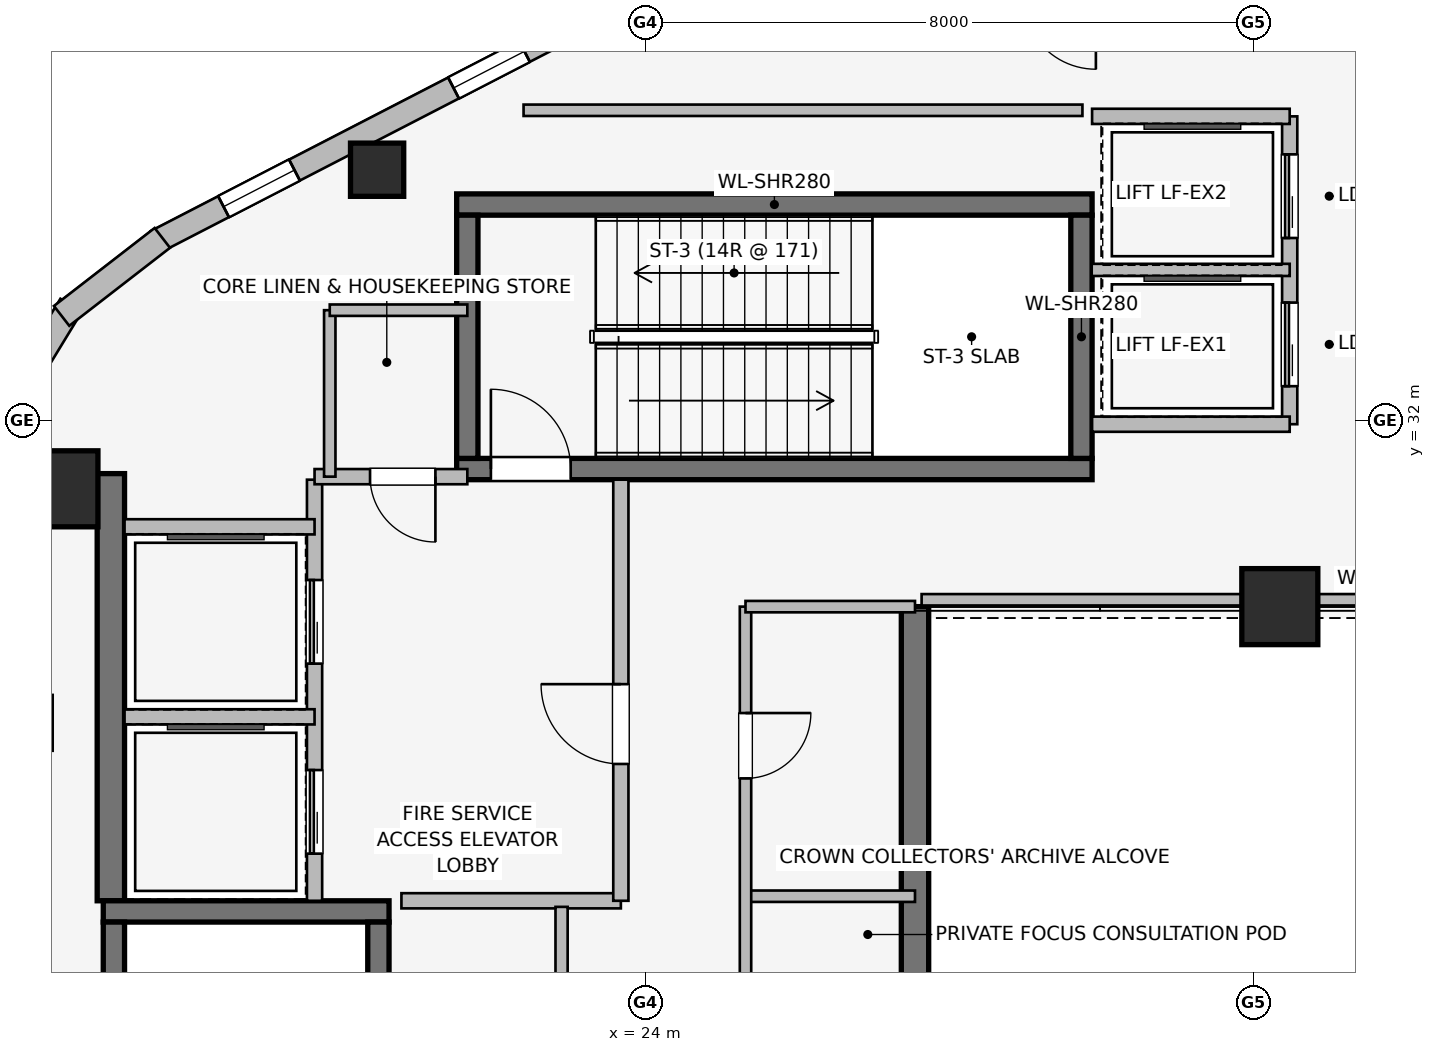
"""IFC4 building model, lengths in metres.
Left out: names, types, materials, properties, quantities, classifications, styles, units other than length and angle.
Written with IfcOpenShell. Run it as: python <this file> out.ifc"""

import sys

from ifc_helpers import new_model, si_unit, direction, frame, frame_2d, origin, origin_2d, place, context, subcontext, project, spatial, rectangle, extrude, element, fill, save


model = new_model("IFC4")
c1 = context("Model", 3, precision=1e-05, world=origin(), true_north=direction((0.0, 1.0)))
c2 = subcontext(c1, "Body", "Model", "MODEL_VIEW")
j1 = project(units=[si_unit("LENGTHUNIT", "METRE"), si_unit("PLANEANGLEUNIT", "RADIAN")], contexts=[c1])
p1 = place(None, origin())
s1 = spatial("IfcSite", under=j1, at=p1, CompositionType="ELEMENT")
p2 = place(p1, origin())
s2 = spatial("IfcBuilding", under=s1, at=p2, CompositionType="ELEMENT")
p3 = place(p2, frame((0.0, 0.0, 275.1)))
s3 = spatial("IfcBuildingStorey", under=s2, at=p3, CompositionType="ELEMENT", Elevation=275.1)
p4 = place(p3, frame((16.97, 25.68, 0.0), z_axis=(0.0, 0.0, 1.0), x_axis=(0.0, 1.0, 0.0)))
e1 = element("IfcWall", 1, at=p4, inside=s3, PredefinedType="SHEAR", context=c2, shape_type="SweptSolid", body=[
    extrude(rectangle(XDim=5.62, YDim=0.36, at=frame_2d((2.81, 0.0))), origin(), (0.0, 0.0, 1.0), 4.8),
])
p5 = place(p3, frame((27.55, 29.55, 0.0), z_axis=(0.0, 0.0, 1.0), x_axis=(0.0, -1.0, 0.0)))
e2 = element("IfcWall", 2, at=p5, inside=s3, PredefinedType="SHEAR", context=c2, shape_type="SweptSolid", body=[
    extrude(rectangle(XDim=11.25, YDim=0.36, at=frame_2d((5.625, 0.0))), origin(), (0.0, 0.0, 1.0), 4.8),
])
p6 = place(p3, frame((20.63, 25.54, 0.0), z_axis=(0.0, 0.0, 1.0), x_axis=(-1.0, 0.0, 0.0)))
e3 = element("IfcWall", 3, at=p6, inside=s3, PredefinedType="SHEAR", context=c2, shape_type="SweptSolid", body=[
    extrude(rectangle(XDim=3.76, YDim=0.28, at=frame_2d((1.88, 0.0))), origin(), (0.0, 0.0, 1.0), 4.8),
])
p7 = place(p3, frame((17.01, 25.4, 0.0), z_axis=(0.0, 0.0, 1.0), x_axis=(0.0, -1.0, 0.0)))
e4 = element("IfcWall", 4, at=p7, inside=s3, PredefinedType="SHEAR", context=c2, shape_type="SweptSolid", body=[
    extrude(rectangle(XDim=7.8, YDim=0.28, at=frame_2d((3.9, 0.0))), origin(), (0.0, 0.0, 1.0), 4.8),
])
p8 = place(p3, frame((20.49, 17.6, 0.0), z_axis=(0.0, 0.0, 1.0), x_axis=(0.0, 1.0, 0.0)))
e5 = element("IfcWall", 5, at=p8, inside=s3, PredefinedType="SHEAR", context=c2, shape_type="SweptSolid", body=[
    extrude(rectangle(XDim=7.8, YDim=0.28, at=frame_2d((3.9, 0.0))), origin(), (0.0, 0.0, 1.0), 4.8),
])
p9 = place(p8, frame((0.44, 0.0, 0.0)))
e6 = element("IfcOpeningElement", 6, at=p9, cuts=e5, PredefinedType="OPENING", context=c2, shape_type="SweptSolid", body=[
    extrude(rectangle(XDim=1.05, YDim=2.0, at=frame_2d((0.525, 1.0))), frame((0.0, 0.15, 0.0), z_axis=(0.0, -1.0, 0.0), x_axis=(1.0, 0.0, 0.0)), (0.0, 0.0, 1.0), 0.3),
])
p10 = place(p3, frame((21.52, 31.36, 0.0), z_axis=(0.0, 0.0, 1.0), x_axis=(1.0, 0.0, 0.0)))
e7 = element("IfcWall", 7, at=p10, inside=s3, PredefinedType="SHEAR", context=c2, shape_type="SweptSolid", body=[
    extrude(rectangle(XDim=8.36, YDim=0.28, at=frame_2d((4.18, 0.0))), origin(), (0.0, 0.0, 1.0), 4.8),
])
p11 = place(p10, frame((0.45, 0.0, 0.0)))
e8 = element("IfcOpeningElement", 8, at=p11, cuts=e7, PredefinedType="OPENING", context=c2, shape_type="SweptSolid", body=[
    extrude(rectangle(XDim=1.05, YDim=2.0, at=frame_2d((0.525, 1.0))), frame((0.0, 0.15, 0.0), z_axis=(0.0, -1.0, 0.0), x_axis=(1.0, 0.0, 0.0)), (0.0, 0.0, 1.0), 0.3),
])
p12 = place(p3, frame((29.88, 34.84, 0.0), z_axis=(0.0, 0.0, 1.0), x_axis=(-1.0, 0.0, 0.0)))
e9 = element("IfcWall", 9, at=p12, inside=s3, PredefinedType="SHEAR", context=c2, shape_type="SweptSolid", body=[
    extrude(rectangle(XDim=8.36, YDim=0.28, at=frame_2d((4.18, 0.0))), origin(), (0.0, 0.0, 1.0), 4.8),
])
for number, where, z_axis, x_axis in (
    (10, (21.66, 34.7, 0.0), (0.0, 0.0, 1.0), (0.0, -1.0, 0.0)),
    (11, (29.74, 31.5, 0.0), (0.0, 0.0, 1.0), (0.0, 1.0, 0.0)),
):
    element("IfcWall", number, at=place(p3, frame(where, z_axis=z_axis, x_axis=x_axis)), inside=s3, PredefinedType="SHEAR", context=c2, shape_type="SweptSolid", body=[
        extrude(rectangle(XDim=3.2, YDim=0.28, at=frame_2d((1.6, 0.0))), origin(), (0.0, 0.0, 1.0), 4.8),
    ])
for number, where, z_axis, x_axis in (
    (12, (16.3, 31.1, 0.0), (0.0, 0.0, 1.0), (1.0, 0.0, 0.0)),
    (13, (32.35, 29.55, 0.0), (0.0, 0.0, 1.0), (1.0, 0.0, 0.0)),
):
    element("IfcColumn", number, at=place(p3, frame(where, z_axis=z_axis, x_axis=x_axis)), inside=s3, PredefinedType="COLUMN", context=c2, shape_type="SweptSolid", body=[
        extrude(rectangle(XDim=1.0, YDim=1.0, at=origin_2d()), origin(), (0.0, 0.0, 1.0), 4.8),
    ])
p13 = place(p3, frame((20.473, 35.298, 0.0), z_axis=(0.0, 0.0, 1.0), x_axis=(1.0, 0.0, 0.0)))
e14 = element("IfcColumn", 14, at=p13, inside=s3, PredefinedType="COLUMN", context=c2, shape_type="SweptSolid", body=[
    extrude(rectangle(XDim=0.7, YDim=0.7, at=origin_2d()), origin(), (0.0, 0.0, 1.0), 4.8),
])
p14 = place(p3, frame((17.566, 34.354, 0.0), z_axis=(0.0, 0.0, 1.0), x_axis=(0.888622971019, 0.458638436437, 0.0)))
e15 = element("IfcWall", 15, at=p14, inside=s3, PredefinedType="STANDARD", context=c2, shape_type="SweptSolid", body=[
    extrude(rectangle(XDim=6.936, YDim=0.31, at=frame_2d((3.468, 0.0))), origin(), (0.0, 0.0, 1.0), 4.49),
])
p15 = place(p14, frame((0.998, 0.0, 0.75)))
e16 = element("IfcOpeningElement", 16, at=p15, cuts=e15, PredefinedType="OPENING", context=c2, shape_type="SweptSolid", body=[
    extrude(rectangle(XDim=1.05, YDim=1.4, at=frame_2d((0.525, 0.7))), frame((0.0, 0.165, 0.0), z_axis=(0.0, -1.0, 0.0), x_axis=(1.0, 0.0, 0.0)), (0.0, 0.0, 1.0), 0.33),
])
p16 = place(p14, frame((4.403, 0.0, 0.75)))
e17 = element("IfcOpeningElement", 17, at=p16, cuts=e15, PredefinedType="OPENING", context=c2, shape_type="SweptSolid", body=[
    extrude(rectangle(XDim=1.05, YDim=1.4, at=frame_2d((0.525, 0.7))), frame((0.0, 0.165, 0.0), z_axis=(0.0, -1.0, 0.0), x_axis=(1.0, 0.0, 0.0)), (0.0, 0.0, 1.0), 0.33),
])
p17 = place(p3, frame((15.574, 32.082, 0.0), z_axis=(0.0, 0.0, 1.0), x_axis=(0.520325409202, 0.853968072318, 0.0)))
e18 = element("IfcWall", 18, at=p17, inside=s3, PredefinedType="STANDARD", context=c2, shape_type="SweptSolid", body=[
    extrude(rectangle(XDim=1.678, YDim=0.33, at=frame_2d((0.839, 0.0))), origin(), (0.0, 0.0, 1.0), 4.49),
])
p18 = place(p3, frame((16.322, 33.375, 0.0), z_axis=(0.0, 0.0, 1.0), x_axis=(0.790691856293, 0.61221433207, 0.0)))
e19 = element("IfcWall", 19, at=p18, inside=s3, PredefinedType="STANDARD", context=c2, shape_type="SweptSolid", body=[
    extrude(rectangle(XDim=1.676, YDim=0.33, at=frame_2d((0.838, 0.0))), origin(), (0.0, 0.0, 1.0), 4.49),
])
p19 = place(p3, frame((19.65, 25.68, 0.0), z_axis=(0.0, 0.0, 1.0), x_axis=(0.0, 1.0, 0.0)))
e20 = element("IfcWall", 20, at=p19, inside=s3, PredefinedType="PARTITIONING", context=c2, shape_type="SweptSolid", body=[
    extrude(rectangle(XDim=5.54, YDim=0.2, at=frame_2d((2.77, 0.0))), origin(), (0.0, 0.0, 1.0), 4.49),
])
p20 = place(p19, frame((0.62, 0.0, 0.0)))
e21 = element("IfcOpeningElement", 21, at=p20, cuts=e20, PredefinedType="OPENING", context=c2, shape_type="SweptSolid", body=[
    extrude(rectangle(XDim=1.1, YDim=2.2, at=frame_2d((0.55, 1.1))), frame((0.0, 0.11, 0.0), z_axis=(0.0, -1.0, 0.0), x_axis=(1.0, 0.0, 0.0)), (0.0, 0.0, 1.0), 0.22),
])
p21 = place(p19, frame((3.12, 0.0, 0.0)))
e22 = element("IfcOpeningElement", 22, at=p21, cuts=e20, PredefinedType="OPENING", context=c2, shape_type="SweptSolid", body=[
    extrude(rectangle(XDim=1.1, YDim=2.2, at=frame_2d((0.55, 1.1))), frame((0.0, 0.11, 0.0), z_axis=(0.0, -1.0, 0.0), x_axis=(1.0, 0.0, 0.0)), (0.0, 0.0, 1.0), 0.22),
])
p22 = place(p3, frame((20.793, 25.68, 0.0), z_axis=(0.0, 0.0, 1.0), x_axis=(1.0, 0.0, 0.0)))
e23 = element("IfcWall", 23, at=p22, inside=s3, PredefinedType="PARTITIONING", context=c2, shape_type="SweptSolid", body=[
    extrude(rectangle(XDim=2.887, YDim=0.2, at=frame_2d((1.443, 0.0))), origin(), (0.0, 0.0, 1.0), 4.49),
])
p23 = place(p3, frame((23.68, 25.68, 0.0), z_axis=(0.0, 0.0, 1.0), x_axis=(0.0, 1.0, 0.0)))
e24 = element("IfcWall", 24, at=p23, inside=s3, PredefinedType="PARTITIONING", context=c2, shape_type="SweptSolid", body=[
    extrude(rectangle(XDim=5.54, YDim=0.2, at=frame_2d((2.77, 0.0))), origin(), (0.0, 0.0, 1.0), 4.49),
])
p24 = place(p23, frame((1.8, 0.0, 0.0)))
e25 = element("IfcOpeningElement", 25, at=p24, cuts=e24, PredefinedType="OPENING", context=c2, shape_type="SweptSolid", body=[
    extrude(rectangle(XDim=1.05, YDim=2.0, at=frame_2d((0.525, 1.0))), frame((0.0, 0.11, 0.0), z_axis=(0.0, -1.0, 0.0), x_axis=(1.0, 0.0, 0.0)), (0.0, 0.0, 1.0), 0.22),
])
p25 = place(p3, frame((21.66, 31.26, 0.0), z_axis=(0.0, 0.0, 1.0), x_axis=(-1.0, 0.0, 0.0)))
e26 = element("IfcWall", 26, at=p25, inside=s3, PredefinedType="PARTITIONING", context=c2, shape_type="SweptSolid", body=[
    extrude(rectangle(XDim=2.01, YDim=0.2, at=frame_2d((1.005, 0.0))), origin(), (0.0, 0.0, 1.0), 4.49),
])
p26 = place(p25, frame((0.42, 0.0, 0.0)))
e27 = element("IfcOpeningElement", 27, at=p26, cuts=e26, PredefinedType="OPENING", context=c2, shape_type="SweptSolid", body=[
    extrude(rectangle(XDim=0.86, YDim=2.0, at=frame_2d((0.43, 1.0))), frame((0.0, 0.11, 0.0), z_axis=(0.0, -1.0, 0.0), x_axis=(1.0, 0.0, 0.0)), (0.0, 0.0, 1.0), 0.22),
])
p27 = place(p3, frame((17.15, 28.1, 0.0), z_axis=(0.0, 0.0, 1.0), x_axis=(1.0, 0.0, 0.0)))
e28 = element("IfcWall", 28, at=p27, inside=s3, PredefinedType="PARTITIONING", context=c2, shape_type="SweptSolid", body=[
    extrude(rectangle(XDim=2.5, YDim=0.2, at=frame_2d((1.25, 0.0))), origin(), (0.0, 0.0, 1.0), 4.49),
])
p28 = place(p3, frame((19.65, 30.6, 0.0), z_axis=(0.0, 0.0, 1.0), x_axis=(-1.0, 0.0, 0.0)))
e29 = element("IfcWall", 29, at=p28, inside=s3, PredefinedType="PARTITIONING", context=c2, shape_type="SweptSolid", body=[
    extrude(rectangle(XDim=2.5, YDim=0.2, at=frame_2d((1.25, 0.0))), origin(), (0.0, 0.0, 1.0), 3.39),
])
p29 = place(p3, frame((32.48, 31.95, 0.0), z_axis=(0.0, 0.0, 1.0), x_axis=(0.0, 1.0, 0.0)))
e30 = element("IfcWall", 30, at=p29, inside=s3, PredefinedType="PARTITIONING", context=c2, shape_type="SweptSolid", body=[
    extrude(rectangle(XDim=4.05, YDim=0.2, at=frame_2d((2.025, 0.0))), origin(), (0.0, 0.0, 1.0), 4.49),
])
p30 = place(p29, frame((0.5, 0.0, 0.0)))
e31 = element("IfcOpeningElement", 31, at=p30, cuts=e30, PredefinedType="OPENING", context=c2, shape_type="SweptSolid", body=[
    extrude(rectangle(XDim=1.1, YDim=2.2, at=frame_2d((0.55, 1.1))), frame((0.0, 0.11, 0.0), z_axis=(0.0, -1.0, 0.0), x_axis=(1.0, 0.0, 0.0)), (0.0, 0.0, 1.0), 0.22),
])
p31 = place(p29, frame((2.45, 0.0, 0.0)))
e32 = element("IfcOpeningElement", 32, at=p31, cuts=e30, PredefinedType="OPENING", context=c2, shape_type="SweptSolid", body=[
    extrude(rectangle(XDim=1.1, YDim=2.2, at=frame_2d((0.55, 1.1))), frame((0.0, 0.11, 0.0), z_axis=(0.0, -1.0, 0.0), x_axis=(1.0, 0.0, 0.0)), (0.0, 0.0, 1.0), 0.22),
])
p32 = place(p3, frame((29.88, 36.0, 0.0), z_axis=(0.0, 0.0, 1.0), x_axis=(1.0, 0.0, 0.0)))
e33 = element("IfcWall", 33, at=p32, inside=s3, PredefinedType="PARTITIONING", context=c2, shape_type="SweptSolid", body=[
    extrude(rectangle(XDim=2.6, YDim=0.2, at=frame_2d((1.3, 0.0))), origin(), (0.0, 0.0, 1.0), 4.49),
])
p33 = place(p3, frame((32.48, 31.95, 0.0), z_axis=(0.0, 0.0, 1.0), x_axis=(-1.0, 0.0, 0.0)))
e34 = element("IfcWall", 34, at=p33, inside=s3, PredefinedType="PARTITIONING", context=c2, shape_type="SweptSolid", body=[
    extrude(rectangle(XDim=2.6, YDim=0.2, at=frame_2d((1.3, 0.0))), origin(), (0.0, 0.0, 1.0), 3.882),
])
p34 = place(p3, frame((29.875, 33.98, 0.0), z_axis=(0.0, 0.0, 1.0), x_axis=(1.0, 0.0, 0.0)))
e35 = element("IfcWall", 35, at=p34, inside=s3, PredefinedType="PARTITIONING", context=c2, shape_type="SweptSolid", body=[
    extrude(rectangle(XDim=2.605, YDim=0.16, at=frame_2d((1.302, 0.0))), origin(), (0.0, 0.0, 1.0), 4.49),
])
p35 = place(p3, frame((22.9, 19.5, 0.0), z_axis=(0.0, 0.0, 1.0), x_axis=(0.0, 1.0, 0.0)))
e36 = element("IfcWall", 36, at=p35, inside=s3, PredefinedType="PARTITIONING", context=c2, shape_type="SweptSolid", body=[
    extrude(rectangle(XDim=6.1, YDim=0.16, at=frame_2d((3.05, 0.0))), origin(), (0.0, 0.0, 1.0), 4.49),
])
p36 = place(p35, frame((2.4, 0.0, 0.0)))
e37 = element("IfcOpeningElement", 37, at=p36, cuts=e36, PredefinedType="OPENING", context=c2, shape_type="SweptSolid", body=[
    extrude(rectangle(XDim=0.9, YDim=2.0, at=frame_2d((0.45, 1.0))), frame((0.0, 0.09, 0.0), z_axis=(0.0, -1.0, 0.0), x_axis=(1.0, 0.0, 0.0)), (0.0, 0.0, 1.0), 0.18),
])
p37 = place(p3, frame((25.32, 25.74, 0.0), z_axis=(0.0, 0.0, 1.0), x_axis=(1.0, 0.0, 0.0)))
e38 = element("IfcWall", 38, at=p37, inside=s3, PredefinedType="PARTITIONING", context=c2, shape_type="SweptSolid", body=[
    extrude(rectangle(XDim=2.23, YDim=0.15, at=frame_2d((1.115, 0.0))), origin(), (0.0, 0.0, 1.0), 4.49),
])
p38 = place(p3, frame((25.32, 29.55, 0.0), z_axis=(0.0, 0.0, 1.0), x_axis=(0.0, -1.0, 0.0)))
e39 = element("IfcWall", 39, at=p38, inside=s3, PredefinedType="PARTITIONING", context=c2, shape_type="SweptSolid", body=[
    extrude(rectangle(XDim=11.19, YDim=0.15, at=frame_2d((5.595, 0.0))), origin(), (0.0, 0.0, 1.0), 4.49),
])
p39 = place(p38, frame((1.4, 0.0, 0.0)))
e40 = element("IfcOpeningElement", 40, at=p39, cuts=e39, PredefinedType="OPENING", context=c2, shape_type="SweptSolid", body=[
    extrude(rectangle(XDim=0.86, YDim=2.0, at=frame_2d((0.43, 1.0))), frame((0.0, 0.085, 0.0), z_axis=(0.0, -1.0, 0.0), x_axis=(1.0, 0.0, 0.0)), (0.0, 0.0, 1.0), 0.17),
])
p40 = place(p38, frame((5.25, 0.0, 0.0)))
e41 = element("IfcOpeningElement", 41, at=p40, cuts=e39, PredefinedType="OPENING", context=c2, shape_type="SweptSolid", body=[
    extrude(rectangle(XDim=0.86, YDim=2.0, at=frame_2d((0.43, 1.0))), frame((0.0, 0.085, 0.0), z_axis=(0.0, -1.0, 0.0), x_axis=(1.0, 0.0, 0.0)), (0.0, 0.0, 1.0), 0.17),
])
p41 = place(p38, frame((9.05, 0.0, 0.0)))
e42 = element("IfcOpeningElement", 42, at=p41, cuts=e39, PredefinedType="OPENING", context=c2, shape_type="SweptSolid", body=[
    extrude(rectangle(XDim=0.86, YDim=2.0, at=frame_2d((0.43, 1.0))), frame((0.0, 0.085, 0.0), z_axis=(0.0, -1.0, 0.0), x_axis=(1.0, 0.0, 0.0)), (0.0, 0.0, 1.0), 0.17),
])
p42 = place(p3, frame((27.55, 29.55, 0.0), z_axis=(0.0, 0.0, 1.0), x_axis=(-1.0, 0.0, 0.0)))
e43 = element("IfcWall", 43, at=p42, inside=s3, PredefinedType="PARTITIONING", context=c2, shape_type="SweptSolid", body=[
    extrude(rectangle(XDim=2.23, YDim=0.15, at=frame_2d((1.115, 0.0))), origin(), (0.0, 0.0, 1.0), 3.39),
])
p43 = place(p3, frame((19.85, 33.45, 0.0), z_axis=(0.0, 0.0, 1.0), x_axis=(0.0, -1.0, 0.0)))
e44 = element("IfcWall", 44, at=p43, inside=s3, PredefinedType="PARTITIONING", context=c2, shape_type="SweptSolid", body=[
    extrude(rectangle(XDim=2.19, YDim=0.15, at=frame_2d((1.095, 0.0))), origin(), (0.0, 0.0, 1.0), 4.49),
])
p44 = place(p3, frame((21.66, 33.45, 0.0), z_axis=(0.0, 0.0, 1.0), x_axis=(-1.0, 0.0, 0.0)))
e45 = element("IfcWall", 45, at=p44, inside=s3, PredefinedType="PARTITIONING", context=c2, shape_type="SweptSolid", body=[
    extrude(rectangle(XDim=1.81, YDim=0.15, at=frame_2d((0.905, 0.0))), origin(), (0.0, 0.0, 1.0), 4.49),
])
p45 = place(p3, frame((39.84, 29.64, 0.0), z_axis=(0.0, 0.0, 1.0), x_axis=(-1.0, 0.0, 0.0)))
e46 = element("IfcWall", 46, at=p45, inside=s3, PredefinedType="PARTITIONING", context=c2, shape_type="SweptSolid", body=[
    extrude(rectangle(XDim=12.203, YDim=0.15, at=frame_2d((6.102, 0.0))), origin(), (0.0, 0.0, 1.0), 3.631),
])
p46 = place(p3, frame((29.753, 36.08, 0.0), z_axis=(0.0, 0.0, 1.0), x_axis=(-1.0, 0.0, 0.0)))
e47 = element("IfcWall", 47, at=p46, inside=s3, PredefinedType="PARTITIONING", context=c2, shape_type="SweptSolid", body=[
    extrude(rectangle(XDim=7.353, YDim=0.15, at=frame_2d((3.677, 0.0))), origin(), (0.0, 0.0, 1.0), 4.49),
])
p47 = place(p15, origin())
e48 = element("IfcWindow", 48, at=p47, inside=s3, PartitioningType="SINGLE_PANEL", PredefinedType="WINDOW", context=c2, shape_type="SweptSolid", body=[
    extrude(rectangle(XDim=1.05, YDim=1.4, at=frame_2d((0.525, 0.7))), frame((0.0, 0.03, 0.0), z_axis=(0.0, -1.0, 0.0), x_axis=(1.0, 0.0, 0.0)), (0.0, 0.0, 1.0), 0.06),
])
fill(e16, e48)
p48 = place(p16, origin())
e49 = element("IfcWindow", 49, at=p48, inside=s3, PartitioningType="SINGLE_PANEL", PredefinedType="WINDOW", context=c2, shape_type="SweptSolid", body=[
    extrude(rectangle(XDim=1.05, YDim=1.4, at=frame_2d((0.525, 0.7))), frame((0.0, 0.03, 0.0), z_axis=(0.0, -1.0, 0.0), x_axis=(1.0, 0.0, 0.0)), (0.0, 0.0, 1.0), 0.06),
])
fill(e17, e49)
p49 = place(p11, origin())
e50 = element("IfcDoor", 50, at=p49, inside=s3, OperationType="SINGLE_SWING_LEFT", PredefinedType="DOOR", context=c2, shape_type="SweptSolid", body=[
    extrude(rectangle(XDim=1.05, YDim=2.0, at=frame_2d((0.525, 1.0))), frame((0.0, 0.025, 0.0), z_axis=(0.0, -1.0, 0.0), x_axis=(1.0, 0.0, 0.0)), (0.0, 0.0, 1.0), 0.05),
])
fill(e8, e50)
p50 = place(p20, origin())
e51 = element("IfcDoor", 51, at=p50, inside=s3, OperationType="SLIDING_TO_LEFT", PredefinedType="DOOR", context=c2, shape_type="SweptSolid", body=[
    extrude(rectangle(XDim=1.1, YDim=2.2, at=frame_2d((0.55, 1.1))), frame((0.0, 0.025, 0.0), z_axis=(0.0, -1.0, 0.0), x_axis=(1.0, 0.0, 0.0)), (0.0, 0.0, 1.0), 0.05),
])
fill(e21, e51)
p51 = place(p21, origin())
e52 = element("IfcDoor", 52, at=p51, inside=s3, OperationType="SLIDING_TO_LEFT", PredefinedType="DOOR", context=c2, shape_type="SweptSolid", body=[
    extrude(rectangle(XDim=1.1, YDim=2.2, at=frame_2d((0.55, 1.1))), frame((0.0, 0.025, 0.0), z_axis=(0.0, -1.0, 0.0), x_axis=(1.0, 0.0, 0.0)), (0.0, 0.0, 1.0), 0.05),
])
fill(e22, e52)
p52 = place(p24, origin())
e53 = element("IfcDoor", 53, at=p52, inside=s3, OperationType="SINGLE_SWING_RIGHT", PredefinedType="DOOR", context=c2, shape_type="SweptSolid", body=[
    extrude(rectangle(XDim=1.05, YDim=2.0, at=frame_2d((0.525, 1.0))), frame((0.0, 0.025, 0.0), z_axis=(0.0, -1.0, 0.0), x_axis=(1.0, 0.0, 0.0)), (0.0, 0.0, 1.0), 0.05),
])
fill(e25, e53)
p53 = place(p26, origin())
e54 = element("IfcDoor", 54, at=p53, inside=s3, OperationType="SINGLE_SWING_LEFT", PredefinedType="DOOR", context=c2, shape_type="SweptSolid", body=[
    extrude(rectangle(XDim=0.86, YDim=2.0, at=frame_2d((0.43, 1.0))), frame((0.0, 0.025, 0.0), z_axis=(0.0, -1.0, 0.0), x_axis=(1.0, 0.0, 0.0)), (0.0, 0.0, 1.0), 0.05),
])
fill(e27, e54)
p54 = place(p30, origin())
e55 = element("IfcDoor", 55, at=p54, inside=s3, OperationType="SLIDING_TO_LEFT", PredefinedType="DOOR", context=c2, shape_type="SweptSolid", body=[
    extrude(rectangle(XDim=1.1, YDim=2.2, at=frame_2d((0.55, 1.1))), frame((0.0, 0.025, 0.0), z_axis=(0.0, -1.0, 0.0), x_axis=(1.0, 0.0, 0.0)), (0.0, 0.0, 1.0), 0.05),
])
fill(e31, e55)
p55 = place(p31, origin())
e56 = element("IfcDoor", 56, at=p55, inside=s3, OperationType="SLIDING_TO_LEFT", PredefinedType="DOOR", context=c2, shape_type="SweptSolid", body=[
    extrude(rectangle(XDim=1.1, YDim=2.2, at=frame_2d((0.55, 1.1))), frame((0.0, 0.025, 0.0), z_axis=(0.0, -1.0, 0.0), x_axis=(1.0, 0.0, 0.0)), (0.0, 0.0, 1.0), 0.05),
])
fill(e32, e56)
p56 = place(p39, origin())
e57 = element("IfcDoor", 57, at=p56, inside=s3, OperationType="SINGLE_SWING_LEFT", PredefinedType="DOOR", context=c2, shape_type="SweptSolid", body=[
    extrude(rectangle(XDim=0.86, YDim=2.0, at=frame_2d((0.43, 1.0))), frame((0.0, 0.025, 0.0), z_axis=(0.0, -1.0, 0.0), x_axis=(1.0, 0.0, 0.0)), (0.0, 0.0, 1.0), 0.05),
])
fill(e40, e57)
save(model, sys.argv[1])
